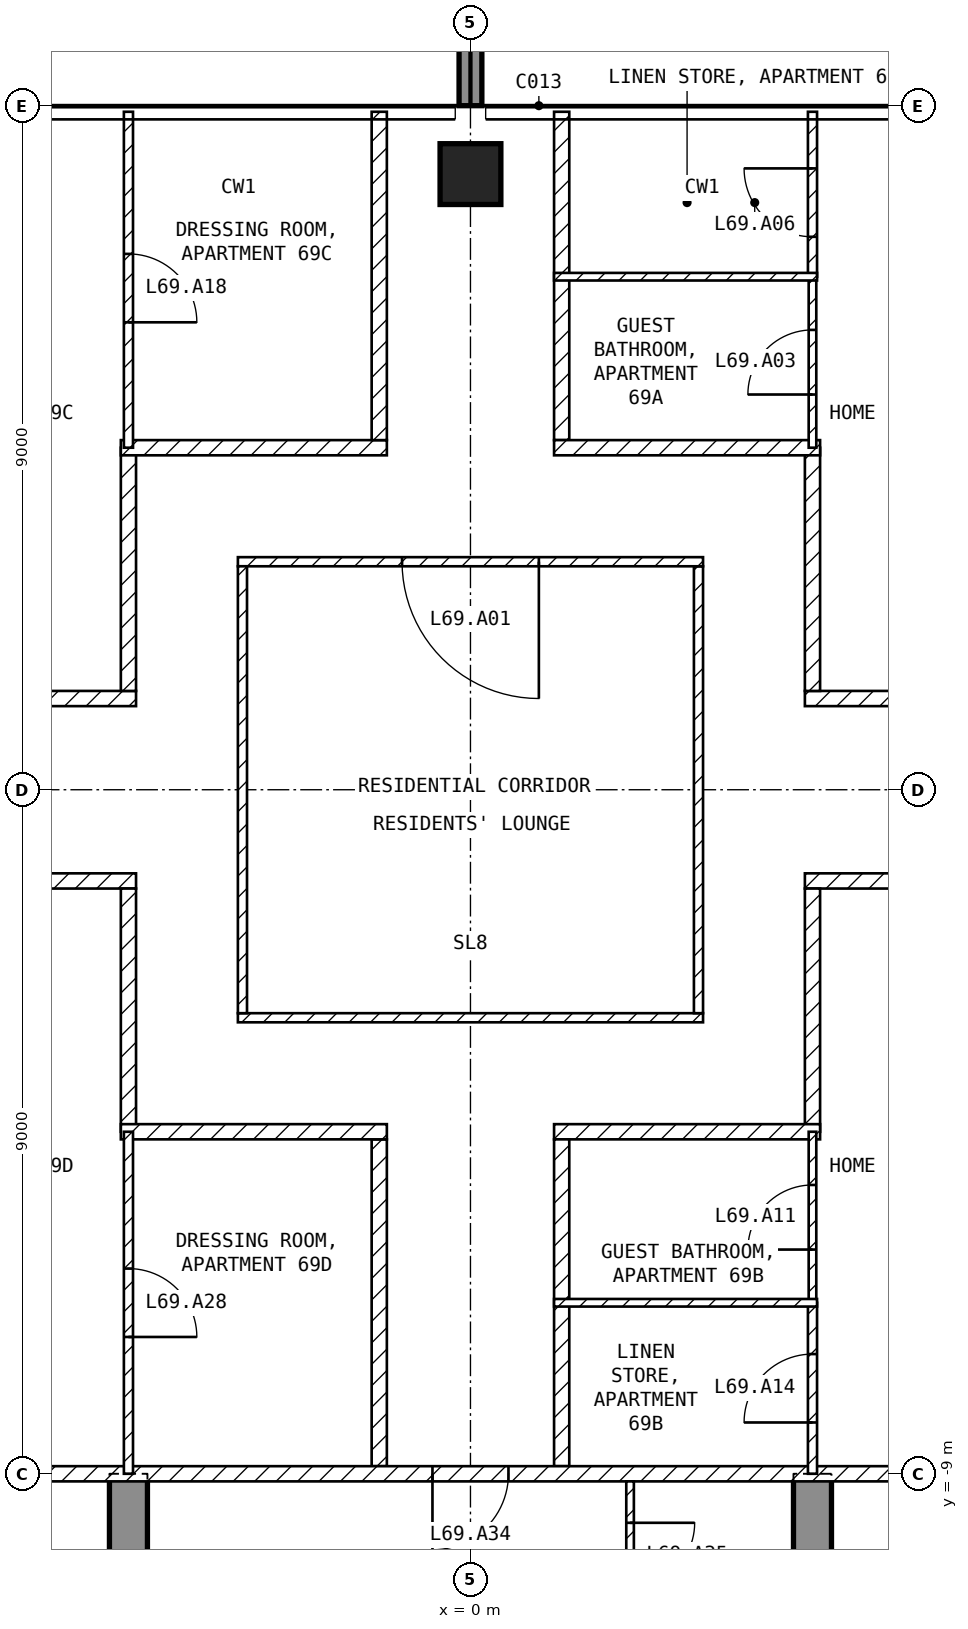
"""IFC4 building model, lengths in metres.
Left out: names, types, materials, properties, quantities, classifications, styles, units other than length and angle.
Written with IfcOpenShell. Run it as: python <this file> out.ifc"""

import sys

from ifc_helpers import new_model, si_unit, direction, frame, frame_2d, origin, origin_2d, place, context, subcontext, project, spatial, polyline, rectangle, outline, extrude, element, fill, save


model = new_model("IFC4")
c1 = context("Model", 3, precision=1e-05, world=origin(), true_north=direction((0.0, 1.0)))
c2 = subcontext(c1, "Body", "Model", "MODEL_VIEW")
j1 = project(units=[si_unit("LENGTHUNIT", "METRE"), si_unit("PLANEANGLEUNIT", "RADIAN")], contexts=[c1])
p1 = place(None, origin())
s1 = spatial("IfcSite", under=j1, at=p1, CompositionType="ELEMENT")
p2 = place(p1, origin())
s2 = spatial("IfcBuilding", under=s1, at=p2, CompositionType="ELEMENT")
p3 = place(p2, frame((0.0, 0.0, 271.0)))
s3 = spatial("IfcBuildingStorey", under=s2, at=p3, CompositionType="ELEMENT", Elevation=271.0)
p4 = place(p3, frame((0.0, 8.1, -0.25), z_axis=(0.0, 0.0, 1.0), x_axis=(1.0, 0.0, 0.0)))
e1 = element("IfcColumn", 1, at=p4, inside=s3, PredefinedType="COLUMN", context=c2, shape_type="SweptSolid", body=[
    extrude(rectangle(XDim=0.8, YDim=0.8, at=origin_2d()), origin(), (0.0, 0.0, 1.0), 3.5),
])
for number, where, z_axis, x_axis in (
    (2, (-4.75, -16.7, -0.25), (1.0, 0.0, 0.0), (0.0, 1.0, 0.0)),
    (3, (4.25, -16.7, -0.25), (1.0, 0.0, 0.0), (0.0, 1.0, 0.0)),
):
    element("IfcWall", number, at=place(p3, frame(where, z_axis=z_axis, x_axis=x_axis)), inside=s3, PredefinedType="SHEAR", context=c2, shape_type="SweptSolid", body=[
        extrude(outline(polyline([(0.0, 0.0), (3.2, 0.0), (3.2, 2.65), (5.6, 2.65), (5.6, 0.0), (7.7, 0.0), (7.7, 3.5), (0.0, 3.5), (0.0, 0.0)])), origin(), (0.0, 0.0, 1.0), 0.5),
    ])
p5 = place(p3, frame((0.0, 9.0, 0.0), z_axis=(0.0, 0.0, 1.0), x_axis=(0.0, 1.0, 0.0)))
e4 = element("IfcWall", 4, at=p5, inside=s3, PredefinedType="SOLIDWALL", context=c2, shape_type="SweptSolid", body=[
    extrude(rectangle(XDim=2.7, YDim=0.3, at=frame_2d((1.35, 0.0))), origin(), (0.0, 0.0, 1.0), 3.25),
])
p6 = place(p3, frame((-3.06, -3.0, 0.0), z_axis=(0.0, 0.0, 1.0), x_axis=(1.0, 0.0, 0.0)))
e5 = element("IfcWall", 5, at=p6, inside=s3, PredefinedType="PARTITIONING", context=c2, shape_type="SweptSolid", body=[
    extrude(rectangle(XDim=6.12, YDim=0.12, at=frame_2d((3.06, 0.0))), origin(), (0.0, 0.0, 1.0), 3.25),
])
p7 = place(p3, frame((3.0, -2.94, 0.0), z_axis=(0.0, 0.0, 1.0), x_axis=(0.0, 1.0, 0.0)))
e6 = element("IfcWall", 6, at=p7, inside=s3, PredefinedType="PARTITIONING", context=c2, shape_type="SweptSolid", body=[
    extrude(rectangle(XDim=5.88, YDim=0.12, at=frame_2d((2.94, 0.0))), origin(), (0.0, 0.0, 1.0), 3.25),
])
p8 = place(p3, frame((3.06, 3.0, 0.0), z_axis=(0.0, 0.0, 1.0), x_axis=(-1.0, 0.0, 0.0)))
e7 = element("IfcWall", 7, at=p8, inside=s3, PredefinedType="PARTITIONING", context=c2, shape_type="SweptSolid", body=[
    extrude(rectangle(XDim=6.12, YDim=0.12, at=frame_2d((3.06, 0.0))), origin(), (0.0, 0.0, 1.0), 3.25),
])
p9 = place(p8, frame((2.16, 0.0, 0.0)))
e8 = element("IfcOpeningElement", 8, at=p9, cuts=e7, PredefinedType="OPENING", context=c2, shape_type="SweptSolid", body=[
    extrude(rectangle(XDim=1.8, YDim=2.1, at=frame_2d((0.9, 1.05))), frame((0.0, 0.07, 0.0), z_axis=(0.0, -1.0, 0.0), x_axis=(1.0, 0.0, 0.0)), (0.0, 0.0, 1.0), 0.14),
])
p10 = place(p3, frame((-3.0, 2.94, 0.0), z_axis=(0.0, 0.0, 1.0), x_axis=(0.0, -1.0, 0.0)))
e9 = element("IfcWall", 9, at=p10, inside=s3, PredefinedType="PARTITIONING", context=c2, shape_type="SweptSolid", body=[
    extrude(rectangle(XDim=5.88, YDim=0.12, at=frame_2d((2.94, 0.0))), origin(), (0.0, 0.0, 1.0), 3.25),
])
p11 = place(p3, frame((4.4, 1.2, 0.0), z_axis=(0.0, 0.0, 1.0), x_axis=(1.0, 0.0, 0.0)))
e10 = element("IfcWall", 10, at=p11, inside=s3, PredefinedType="PARTITIONING", context=c2, shape_type="SweptSolid", body=[
    extrude(rectangle(XDim=17.2, YDim=0.2, at=frame_2d((8.6, 0.0))), origin(), (0.0, 0.0, 1.0), 3.25),
])
p12 = place(p11, frame((13.175, 0.0, 0.0)))
e11 = element("IfcOpeningElement", 11, at=p12, cuts=e10, PredefinedType="OPENING", context=c2, shape_type="SweptSolid", body=[
    extrude(rectangle(XDim=1.0, YDim=2.1, at=frame_2d((0.5, 1.05))), frame((0.0, 0.11, 0.0), z_axis=(0.0, -1.0, 0.0), x_axis=(1.0, 0.0, 0.0)), (0.0, 0.0, 1.0), 0.22),
])
p13 = place(p3, frame((4.5, 4.5, 0.0), z_axis=(0.0, 0.0, 1.0), x_axis=(0.0, -1.0, 0.0)))
e12 = element("IfcWall", 12, at=p13, inside=s3, PredefinedType="PARTITIONING", context=c2, shape_type="SweptSolid", body=[
    extrude(rectangle(XDim=3.2, YDim=0.2, at=frame_2d((1.6, 0.0))), origin(), (0.0, 0.0, 1.0), 3.25),
])
p14 = place(p3, frame((1.2, 8.92, 0.0), z_axis=(0.0, 0.0, 1.0), x_axis=(0.0, -1.0, 0.0)))
e13 = element("IfcWall", 13, at=p14, inside=s3, PredefinedType="PARTITIONING", context=c2, shape_type="SweptSolid", body=[
    extrude(rectangle(XDim=4.32, YDim=0.2, at=frame_2d((2.16, 0.0))), origin(), (0.0, 0.0, 1.0), 3.25),
])
p15 = place(p3, frame((1.1, 4.5, 0.0), z_axis=(0.0, 0.0, 1.0), x_axis=(1.0, 0.0, 0.0)))
e14 = element("IfcWall", 14, at=p15, inside=s3, PredefinedType="PARTITIONING", context=c2, shape_type="SweptSolid", body=[
    extrude(rectangle(XDim=3.5, YDim=0.2, at=frame_2d((1.75, 0.0))), origin(), (0.0, 0.0, 1.0), 3.25),
])
p16 = place(p3, frame((21.6, -1.2, 0.0), z_axis=(0.0, 0.0, 1.0), x_axis=(-1.0, 0.0, 0.0)))
e15 = element("IfcWall", 15, at=p16, inside=s3, PredefinedType="PARTITIONING", context=c2, shape_type="SweptSolid", body=[
    extrude(rectangle(XDim=17.2, YDim=0.2, at=frame_2d((8.6, 0.0))), origin(), (0.0, 0.0, 1.0), 3.25),
])
p17 = place(p16, frame((10.45, 0.0, 0.0)))
e16 = element("IfcOpeningElement", 16, at=p17, cuts=e15, PredefinedType="OPENING", context=c2, shape_type="SweptSolid", body=[
    extrude(rectangle(XDim=1.0, YDim=2.1, at=frame_2d((0.5, 1.05))), frame((0.0, 0.11, 0.0), z_axis=(0.0, -1.0, 0.0), x_axis=(1.0, 0.0, 0.0)), (0.0, 0.0, 1.0), 0.22),
])
p18 = place(p3, frame((4.5, -1.3, 0.0), z_axis=(0.0, 0.0, 1.0), x_axis=(0.0, -1.0, 0.0)))
e17 = element("IfcWall", 17, at=p18, inside=s3, PredefinedType="PARTITIONING", context=c2, shape_type="SweptSolid", body=[
    extrude(rectangle(XDim=3.2, YDim=0.2, at=frame_2d((1.6, 0.0))), origin(), (0.0, 0.0, 1.0), 3.25),
])
p19 = place(p3, frame((4.6, -4.5, 0.0), z_axis=(0.0, 0.0, 1.0), x_axis=(-1.0, 0.0, 0.0)))
e18 = element("IfcWall", 18, at=p19, inside=s3, PredefinedType="PARTITIONING", context=c2, shape_type="SweptSolid", body=[
    extrude(rectangle(XDim=3.5, YDim=0.2, at=frame_2d((1.75, 0.0))), origin(), (0.0, 0.0, 1.0), 3.25),
])
p20 = place(p3, frame((1.2, -4.6, 0.0), z_axis=(0.0, 0.0, 1.0), x_axis=(0.0, -1.0, 0.0)))
e19 = element("IfcWall", 19, at=p20, inside=s3, PredefinedType="PARTITIONING", context=c2, shape_type="SweptSolid", body=[
    extrude(rectangle(XDim=4.3, YDim=0.2, at=frame_2d((2.15, 0.0))), origin(), (0.0, 0.0, 1.0), 3.25),
])
p21 = place(p3, frame((-21.6, 1.2, 0.0), z_axis=(0.0, 0.0, 1.0), x_axis=(1.0, 0.0, 0.0)))
e20 = element("IfcWall", 20, at=p21, inside=s3, PredefinedType="PARTITIONING", context=c2, shape_type="SweptSolid", body=[
    extrude(rectangle(XDim=17.2, YDim=0.2, at=frame_2d((8.6, 0.0))), origin(), (0.0, 0.0, 1.0), 3.25),
])
p22 = place(p21, frame((3.85, 0.0, 0.0)))
e21 = element("IfcOpeningElement", 21, at=p22, cuts=e20, PredefinedType="OPENING", context=c2, shape_type="SweptSolid", body=[
    extrude(rectangle(XDim=1.0, YDim=2.1, at=frame_2d((0.5, 1.05))), frame((0.0, 0.11, 0.0), z_axis=(0.0, -1.0, 0.0), x_axis=(1.0, 0.0, 0.0)), (0.0, 0.0, 1.0), 0.22),
])
p23 = place(p3, frame((-4.5, 1.3, 0.0), z_axis=(0.0, 0.0, 1.0), x_axis=(0.0, 1.0, 0.0)))
e22 = element("IfcWall", 22, at=p23, inside=s3, PredefinedType="PARTITIONING", context=c2, shape_type="SweptSolid", body=[
    extrude(rectangle(XDim=3.2, YDim=0.2, at=frame_2d((1.6, 0.0))), origin(), (0.0, 0.0, 1.0), 3.25),
])
p24 = place(p3, frame((-4.6, 4.5, 0.0), z_axis=(0.0, 0.0, 1.0), x_axis=(1.0, 0.0, 0.0)))
e23 = element("IfcWall", 23, at=p24, inside=s3, PredefinedType="PARTITIONING", context=c2, shape_type="SweptSolid", body=[
    extrude(rectangle(XDim=3.5, YDim=0.2, at=frame_2d((1.75, 0.0))), origin(), (0.0, 0.0, 1.0), 3.25),
])
p25 = place(p3, frame((-1.2, 4.6, 0.0), z_axis=(0.0, 0.0, 1.0), x_axis=(0.0, 1.0, 0.0)))
e24 = element("IfcWall", 24, at=p25, inside=s3, PredefinedType="PARTITIONING", context=c2, shape_type="SweptSolid", body=[
    extrude(rectangle(XDim=4.32, YDim=0.2, at=frame_2d((2.16, 0.0))), origin(), (0.0, 0.0, 1.0), 3.25),
])
p26 = place(p3, frame((-4.4, -1.2, 0.0), z_axis=(0.0, 0.0, 1.0), x_axis=(-1.0, 0.0, 0.0)))
e25 = element("IfcWall", 25, at=p26, inside=s3, PredefinedType="PARTITIONING", context=c2, shape_type="SweptSolid", body=[
    extrude(rectangle(XDim=17.2, YDim=0.2, at=frame_2d((8.6, 0.0))), origin(), (0.0, 0.0, 1.0), 3.25),
])
p27 = place(p26, frame((11.6, 0.0, 0.0)))
e26 = element("IfcOpeningElement", 26, at=p27, cuts=e25, PredefinedType="OPENING", context=c2, shape_type="SweptSolid", body=[
    extrude(rectangle(XDim=1.0, YDim=2.1, at=frame_2d((0.5, 1.05))), frame((0.0, 0.11, 0.0), z_axis=(0.0, -1.0, 0.0), x_axis=(1.0, 0.0, 0.0)), (0.0, 0.0, 1.0), 0.22),
])
p28 = place(p3, frame((-4.5, -4.5, 0.0), z_axis=(0.0, 0.0, 1.0), x_axis=(0.0, 1.0, 0.0)))
e27 = element("IfcWall", 27, at=p28, inside=s3, PredefinedType="PARTITIONING", context=c2, shape_type="SweptSolid", body=[
    extrude(rectangle(XDim=3.2, YDim=0.2, at=frame_2d((1.6, 0.0))), origin(), (0.0, 0.0, 1.0), 3.25),
])
p29 = place(p3, frame((-1.2, -8.9, 0.0), z_axis=(0.0, 0.0, 1.0), x_axis=(0.0, 1.0, 0.0)))
e28 = element("IfcWall", 28, at=p29, inside=s3, PredefinedType="PARTITIONING", context=c2, shape_type="SweptSolid", body=[
    extrude(rectangle(XDim=4.3, YDim=0.2, at=frame_2d((2.15, 0.0))), origin(), (0.0, 0.0, 1.0), 3.25),
])
p30 = place(p3, frame((-1.1, -4.5, 0.0), z_axis=(0.0, 0.0, 1.0), x_axis=(-1.0, 0.0, 0.0)))
e29 = element("IfcWall", 29, at=p30, inside=s3, PredefinedType="PARTITIONING", context=c2, shape_type="SweptSolid", body=[
    extrude(rectangle(XDim=3.5, YDim=0.2, at=frame_2d((1.75, 0.0))), origin(), (0.0, 0.0, 1.0), 3.25),
])
p31 = place(p3, frame((8.92, -9.0, 0.0), z_axis=(0.0, 0.0, 1.0), x_axis=(-1.0, 0.0, 0.0)))
e30 = element("IfcWall", 30, at=p31, inside=s3, PredefinedType="PARTITIONING", context=c2, shape_type="SweptSolid", body=[
    extrude(rectangle(XDim=17.84, YDim=0.2, at=frame_2d((8.92, 0.0))), origin(), (0.0, 0.0, 1.0), 3.25),
])
p32 = place(p31, frame((8.42, 0.0, 0.0)))
e31 = element("IfcOpeningElement", 31, at=p32, cuts=e30, PredefinedType="OPENING", context=c2, shape_type="SweptSolid", body=[
    extrude(rectangle(XDim=1.0, YDim=2.1, at=frame_2d((0.5, 1.05))), frame((0.0, 0.11, 0.0), z_axis=(0.0, -1.0, 0.0), x_axis=(1.0, 0.0, 0.0)), (0.0, 0.0, 1.0), 0.22),
])
p33 = place(p3, frame((4.5, 4.5, 0.0), z_axis=(0.0, 0.0, 1.0), x_axis=(0.0, 1.0, 0.0)))
e32 = element("IfcWall", 32, at=p33, inside=s3, PredefinedType="PARTITIONING", context=c2, shape_type="SweptSolid", body=[
    extrude(rectangle(XDim=2.25, YDim=0.1, at=frame_2d((1.125, 0.0))), origin(), (0.0, 0.0, 1.0), 3.25),
])
p34 = place(p33, frame((0.7, 0.0, 0.0)))
e33 = element("IfcOpeningElement", 33, at=p34, cuts=e32, PredefinedType="OPENING", context=c2, shape_type="SweptSolid", body=[
    extrude(rectangle(XDim=0.85, YDim=2.1, at=frame_2d((0.425, 1.05))), frame((0.0, 0.06, 0.0), z_axis=(0.0, -1.0, 0.0), x_axis=(1.0, 0.0, 0.0)), (0.0, 0.0, 1.0), 0.12),
])
p35 = place(p3, frame((4.5, 6.75, 0.0), z_axis=(0.0, 0.0, 1.0), x_axis=(0.0, 1.0, 0.0)))
e34 = element("IfcWall", 34, at=p35, inside=s3, PredefinedType="PARTITIONING", context=c2, shape_type="SweptSolid", body=[
    extrude(rectangle(XDim=2.17, YDim=0.12, at=frame_2d((1.085, 0.0))), origin(), (0.0, 0.0, 1.0), 3.25),
])
p36 = place(p35, frame((0.525, 0.0, 0.0)))
e35 = element("IfcOpeningElement", 35, at=p36, cuts=e34, PredefinedType="OPENING", context=c2, shape_type="SweptSolid", body=[
    extrude(rectangle(XDim=0.9, YDim=2.1, at=frame_2d((0.45, 1.05))), frame((0.0, 0.07, 0.0), z_axis=(0.0, -1.0, 0.0), x_axis=(1.0, 0.0, 0.0)), (0.0, 0.0, 1.0), 0.14),
])
p37 = place(p3, frame((1.1, 6.75, 0.0), z_axis=(0.0, 0.0, 1.0), x_axis=(1.0, 0.0, 0.0)))
e36 = element("IfcWall", 36, at=p37, inside=s3, PredefinedType="PARTITIONING", context=c2, shape_type="SweptSolid", body=[
    extrude(rectangle(XDim=3.46, YDim=0.1, at=frame_2d((1.73, 0.0))), origin(), (0.0, 0.0, 1.0), 3.25),
])
p38 = place(p3, frame((4.5, -6.75, 0.0), z_axis=(0.0, 0.0, 1.0), x_axis=(0.0, 1.0, 0.0)))
e37 = element("IfcWall", 37, at=p38, inside=s3, PredefinedType="PARTITIONING", context=c2, shape_type="SweptSolid", body=[
    extrude(rectangle(XDim=2.25, YDim=0.1, at=frame_2d((1.125, 0.0))), origin(), (0.0, 0.0, 1.0), 3.25),
])
p39 = place(p38, frame((0.7, 0.0, 0.0)))
e38 = element("IfcOpeningElement", 38, at=p39, cuts=e37, PredefinedType="OPENING", context=c2, shape_type="SweptSolid", body=[
    extrude(rectangle(XDim=0.85, YDim=2.1, at=frame_2d((0.425, 1.05))), frame((0.0, 0.06, 0.0), z_axis=(0.0, -1.0, 0.0), x_axis=(1.0, 0.0, 0.0)), (0.0, 0.0, 1.0), 0.12),
])
p40 = place(p3, frame((4.5, -9.0, 0.0), z_axis=(0.0, 0.0, 1.0), x_axis=(0.0, 1.0, 0.0)))
e39 = element("IfcWall", 39, at=p40, inside=s3, PredefinedType="PARTITIONING", context=c2, shape_type="SweptSolid", body=[
    extrude(rectangle(XDim=2.25, YDim=0.12, at=frame_2d((1.125, 0.0))), origin(), (0.0, 0.0, 1.0), 3.25),
])
p41 = place(p40, frame((0.675, 0.0, 0.0)))
e40 = element("IfcOpeningElement", 40, at=p41, cuts=e39, PredefinedType="OPENING", context=c2, shape_type="SweptSolid", body=[
    extrude(rectangle(XDim=0.9, YDim=2.1, at=frame_2d((0.45, 1.05))), frame((0.0, 0.07, 0.0), z_axis=(0.0, -1.0, 0.0), x_axis=(1.0, 0.0, 0.0)), (0.0, 0.0, 1.0), 0.14),
])
p42 = place(p3, frame((4.56, -6.75, 0.0), z_axis=(0.0, 0.0, 1.0), x_axis=(-1.0, 0.0, 0.0)))
e41 = element("IfcWall", 41, at=p42, inside=s3, PredefinedType="PARTITIONING", context=c2, shape_type="SweptSolid", body=[
    extrude(rectangle(XDim=3.46, YDim=0.1, at=frame_2d((1.73, 0.0))), origin(), (0.0, 0.0, 1.0), 3.25),
])
p43 = place(p3, frame((-4.5, 8.92, 0.0), z_axis=(0.0, 0.0, 1.0), x_axis=(0.0, -1.0, 0.0)))
e42 = element("IfcWall", 42, at=p43, inside=s3, PredefinedType="PARTITIONING", context=c2, shape_type="SweptSolid", body=[
    extrude(rectangle(XDim=4.42, YDim=0.12, at=frame_2d((2.21, 0.0))), origin(), (0.0, 0.0, 1.0), 3.25),
])
p44 = place(p43, frame((1.87, 0.0, 0.0)))
e43 = element("IfcOpeningElement", 43, at=p44, cuts=e42, PredefinedType="OPENING", context=c2, shape_type="SweptSolid", body=[
    extrude(rectangle(XDim=0.9, YDim=2.1, at=frame_2d((0.45, 1.05))), frame((0.0, 0.07, 0.0), z_axis=(0.0, -1.0, 0.0), x_axis=(1.0, 0.0, 0.0)), (0.0, 0.0, 1.0), 0.14),
])
p45 = place(p3, frame((-4.5, -4.5, 0.0), z_axis=(0.0, 0.0, 1.0), x_axis=(0.0, -1.0, 0.0)))
e44 = element("IfcWall", 44, at=p45, inside=s3, PredefinedType="PARTITIONING", context=c2, shape_type="SweptSolid", body=[
    extrude(rectangle(XDim=4.5, YDim=0.12, at=frame_2d((2.25, 0.0))), origin(), (0.0, 0.0, 1.0), 3.25),
])
p46 = place(p45, frame((1.8, 0.0, 0.0)))
e45 = element("IfcOpeningElement", 45, at=p46, cuts=e44, PredefinedType="OPENING", context=c2, shape_type="SweptSolid", body=[
    extrude(rectangle(XDim=0.9, YDim=2.1, at=frame_2d((0.45, 1.05))), frame((0.0, 0.07, 0.0), z_axis=(0.0, -1.0, 0.0), x_axis=(1.0, 0.0, 0.0)), (0.0, 0.0, 1.0), 0.14),
])
p47 = place(p3, frame((2.1, -9.1, 0.0), z_axis=(0.0, 0.0, 1.0), x_axis=(0.0, -1.0, 0.0)))
e46 = element("IfcWall", 46, at=p47, inside=s3, PredefinedType="PARTITIONING", context=c2, shape_type="SweptSolid", body=[
    extrude(rectangle(XDim=1.94, YDim=0.1, at=frame_2d((0.97, 0.0))), origin(), (0.0, 0.0, 1.0), 3.25),
])
p48 = place(p47, frame((0.545, 0.0, 0.0)))
e47 = element("IfcOpeningElement", 47, at=p48, cuts=e46, PredefinedType="OPENING", context=c2, shape_type="SweptSolid", body=[
    extrude(rectangle(XDim=0.85, YDim=2.1, at=frame_2d((0.425, 1.05))), frame((0.0, 0.06, 0.0), z_axis=(0.0, -1.0, 0.0), x_axis=(1.0, 0.0, 0.0)), (0.0, 0.0, 1.0), 0.12),
])
p49 = place(p9, origin())
e48 = element("IfcDoor", 48, at=p49, inside=s3, OperationType="SINGLE_SWING_LEFT", PredefinedType="DOOR", context=c2, shape_type="SweptSolid", body=[
    extrude(rectangle(XDim=1.8, YDim=2.1, at=frame_2d((0.9, 1.05))), frame((0.0, 0.025, 0.0), z_axis=(0.0, -1.0, 0.0), x_axis=(1.0, 0.0, 0.0)), (0.0, 0.0, 1.0), 0.05),
])
fill(e8, e48)
p50 = place(p34, origin())
e49 = element("IfcDoor", 49, at=p50, inside=s3, OperationType="SINGLE_SWING_LEFT", PredefinedType="DOOR", context=c2, shape_type="SweptSolid", body=[
    extrude(rectangle(XDim=0.85, YDim=2.1, at=frame_2d((0.425, 1.05))), frame((0.0, 0.025, 0.0), z_axis=(0.0, -1.0, 0.0), x_axis=(1.0, 0.0, 0.0)), (0.0, 0.0, 1.0), 0.05),
])
fill(e33, e49)
p51 = place(p36, origin())
e50 = element("IfcDoor", 50, at=p51, inside=s3, OperationType="SINGLE_SWING_RIGHT", PredefinedType="DOOR", context=c2, shape_type="SweptSolid", body=[
    extrude(rectangle(XDim=0.9, YDim=2.1, at=frame_2d((0.45, 1.05))), frame((0.0, 0.025, 0.0), z_axis=(0.0, -1.0, 0.0), x_axis=(1.0, 0.0, 0.0)), (0.0, 0.0, 1.0), 0.05),
])
fill(e35, e50)
p52 = place(p39, origin())
e51 = element("IfcDoor", 51, at=p52, inside=s3, OperationType="SINGLE_SWING_LEFT", PredefinedType="DOOR", context=c2, shape_type="SweptSolid", body=[
    extrude(rectangle(XDim=0.85, YDim=2.1, at=frame_2d((0.425, 1.05))), frame((0.0, 0.025, 0.0), z_axis=(0.0, -1.0, 0.0), x_axis=(1.0, 0.0, 0.0)), (0.0, 0.0, 1.0), 0.05),
])
fill(e38, e51)
p53 = place(p41, origin())
e52 = element("IfcDoor", 52, at=p53, inside=s3, OperationType="SINGLE_SWING_LEFT", PredefinedType="DOOR", context=c2, shape_type="SweptSolid", body=[
    extrude(rectangle(XDim=0.9, YDim=2.1, at=frame_2d((0.45, 1.05))), frame((0.0, 0.025, 0.0), z_axis=(0.0, -1.0, 0.0), x_axis=(1.0, 0.0, 0.0)), (0.0, 0.0, 1.0), 0.05),
])
fill(e40, e52)
p54 = place(p44, origin())
e53 = element("IfcDoor", 53, at=p54, inside=s3, OperationType="SINGLE_SWING_RIGHT", PredefinedType="DOOR", context=c2, shape_type="SweptSolid", body=[
    extrude(rectangle(XDim=0.9, YDim=2.1, at=frame_2d((0.45, 1.05))), frame((0.0, 0.025, 0.0), z_axis=(0.0, -1.0, 0.0), x_axis=(1.0, 0.0, 0.0)), (0.0, 0.0, 1.0), 0.05),
])
fill(e43, e53)
p55 = place(p46, origin())
e54 = element("IfcDoor", 54, at=p55, inside=s3, OperationType="SINGLE_SWING_RIGHT", PredefinedType="DOOR", context=c2, shape_type="SweptSolid", body=[
    extrude(rectangle(XDim=0.9, YDim=2.1, at=frame_2d((0.45, 1.05))), frame((0.0, 0.025, 0.0), z_axis=(0.0, -1.0, 0.0), x_axis=(1.0, 0.0, 0.0)), (0.0, 0.0, 1.0), 0.05),
])
fill(e45, e54)
p56 = place(p32, origin())
e55 = element("IfcDoor", 55, at=p56, inside=s3, OperationType="SINGLE_SWING_RIGHT", PredefinedType="DOOR", context=c2, shape_type="SweptSolid", body=[
    extrude(rectangle(XDim=1.0, YDim=2.1, at=frame_2d((0.5, 1.05))), frame((0.0, 0.025, 0.0), z_axis=(0.0, -1.0, 0.0), x_axis=(1.0, 0.0, 0.0)), (0.0, 0.0, 1.0), 0.05),
])
fill(e31, e55)
p57 = place(p48, origin())
e56 = element("IfcDoor", 56, at=p57, inside=s3, OperationType="SINGLE_SWING_LEFT", PredefinedType="DOOR", context=c2, shape_type="SweptSolid", body=[
    extrude(rectangle(XDim=0.85, YDim=2.1, at=frame_2d((0.425, 1.05))), frame((0.0, 0.025, 0.0), z_axis=(0.0, -1.0, 0.0), x_axis=(1.0, 0.0, 0.0)), (0.0, 0.0, 1.0), 0.05),
])
fill(e47, e56)
save(model, sys.argv[1])
